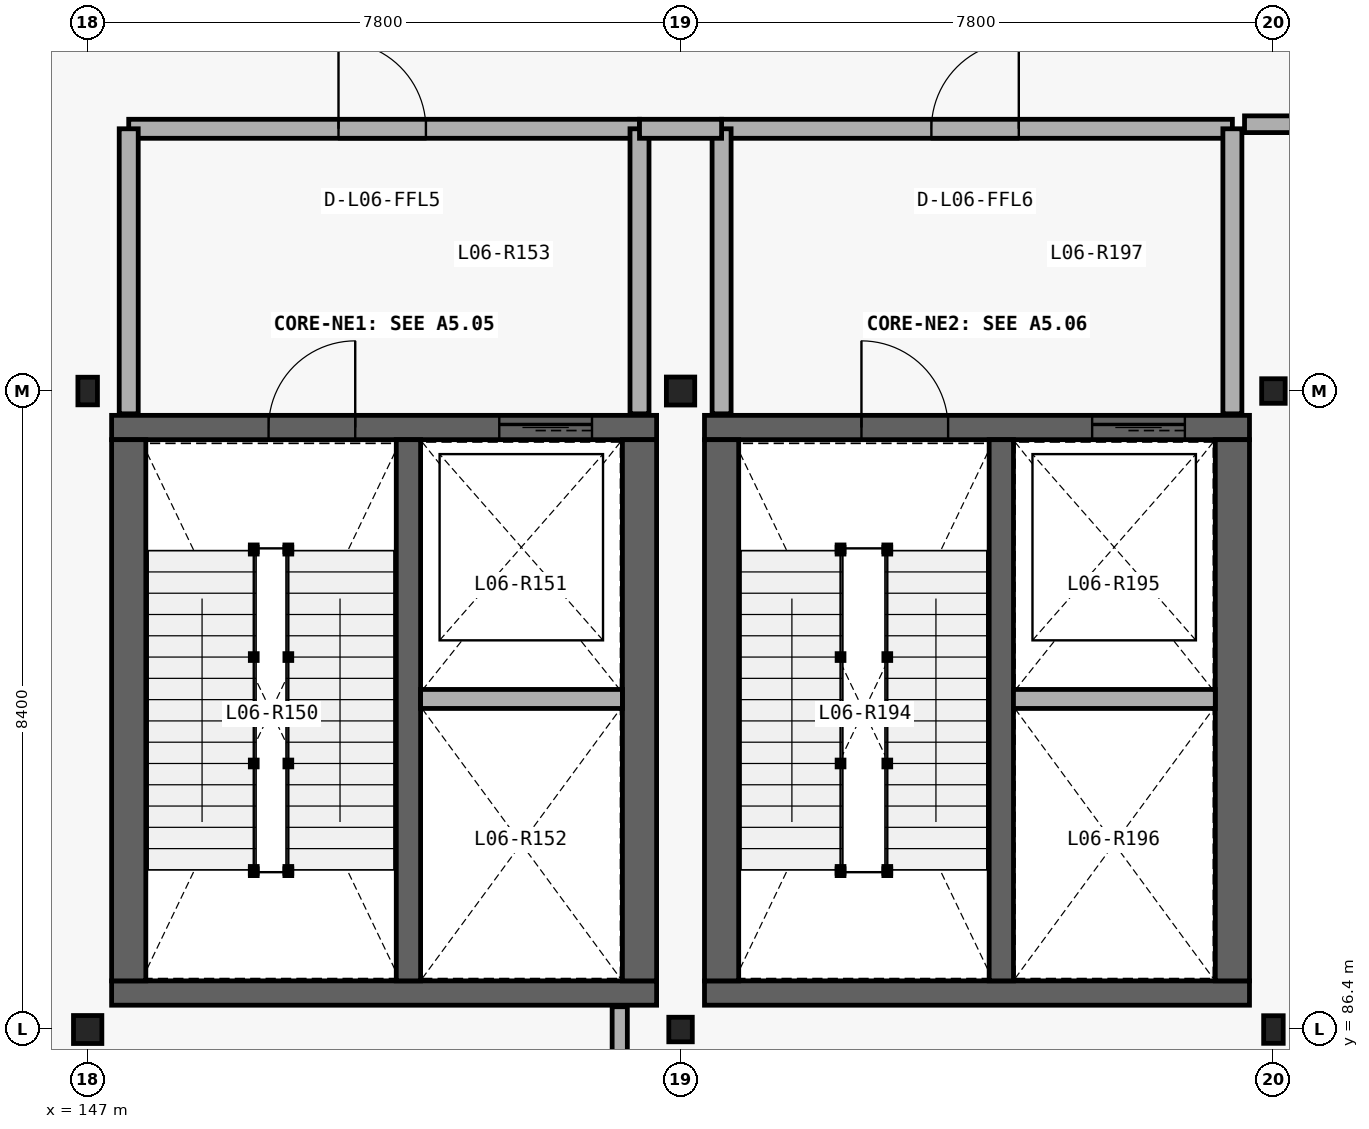
"""IFC4 building model, lengths in metres.
Left out: names, types, materials, properties, quantities, classifications, styles, units other than length and angle.
Written with IfcOpenShell. Run it as: python <this file> out.ifc"""

import sys

from ifc_helpers import new_model, si_unit, direction, frame, frame_2d, origin_with_axes, origin_2d_with_axis, place, context, subcontext, project, spatial, rectangle, i_section, extrude, element, fill, save


model = new_model("IFC4")
c1 = context("Model", 3, precision=1e-05, world=origin_with_axes(), true_north=direction((0.0, 1.0)))
c2 = subcontext(c1, "Body", "Model", "MODEL_VIEW")
j1 = project(units=[si_unit("LENGTHUNIT", "METRE"), si_unit("PLANEANGLEUNIT", "RADIAN")], contexts=[c1])
p1 = place(None, origin_with_axes())
s1 = spatial("IfcSite", under=j1, at=p1, CompositionType="ELEMENT")
p2 = place(p1, origin_with_axes())
s2 = spatial("IfcBuilding", under=s1, at=p2, CompositionType="ELEMENT")
p3 = place(p2, frame((0.0, 0.0, 29.7), z_axis=(0.0, 0.0, 1.0), x_axis=(1.0, 0.0, 0.0)))
s3 = spatial("IfcBuildingStorey", under=s2, at=p3, CompositionType="ELEMENT", Elevation=29.7)
p4 = place(None, frame((147.315, 86.88, 29.7), z_axis=(0.0, 0.0, 1.0), x_axis=(1.0, 0.0, 0.0)))
e1 = element("IfcWall", 1, at=p4, inside=s3, PredefinedType="SHEAR", context=c2, shape_type="SweptSolid", body=[
    extrude(rectangle(XDim=7.17, YDim=0.32, at=frame_2d((3.585, 0.0), x_axis=(1.0, 0.0))), origin_with_axes(), (0.0, 0.0, 1.0), 4.8),
])
p5 = place(None, frame((154.485, 94.32, 29.7), z_axis=(0.0, 0.0, 1.0), x_axis=(-1.0, 0.0, 0.0)))
e2 = element("IfcWall", 2, at=p5, inside=s3, PredefinedType="SHEAR", context=c2, shape_type="SweptSolid", body=[
    extrude(rectangle(XDim=7.17, YDim=0.32, at=frame_2d((3.585, 0.0), x_axis=(1.0, 0.0))), origin_with_axes(), (0.0, 0.0, 1.0), 4.8),
])
p6 = place(None, frame((149.95, 94.32, 29.7), z_axis=(0.0, 0.0, 1.0), x_axis=(-1.0, 0.0, 0.0)))
e3 = element("IfcOpeningElement", 3, at=p6, cuts=e2, PredefinedType="OPENING", context=c2, shape_type="SweptSolid", body=[
    extrude(rectangle(XDim=1.14, YDim=2.18, at=frame_2d((0.0, 1.09), x_axis=(1.0, 0.0))), frame((0.0, 0.17, 0.0), z_axis=(0.0, -1.0, 0.0), x_axis=(1.0, 0.0, 0.0)), (0.0, 0.0, 1.0), 0.34),
])
p7 = place(None, frame((153.025, 94.32, 29.7), z_axis=(0.0, 0.0, 1.0), x_axis=(-1.0, 0.0, 0.0)))
e4 = element("IfcOpeningElement", 4, at=p7, cuts=e2, PredefinedType="OPENING", context=c2, shape_type="SweptSolid", body=[
    extrude(rectangle(XDim=1.22, YDim=2.28, at=frame_2d((0.0, 1.14), x_axis=(1.0, 0.0))), frame((0.0, 0.17, 0.0), z_axis=(0.0, -1.0, 0.0), x_axis=(1.0, 0.0, 0.0)), (0.0, 0.0, 1.0), 0.34),
])
for number, where, z_axis, x_axis in (
    (5, (154.26, 87.04, 29.7), (0.0, 0.0, 1.0), (0.0, 1.0, 0.0)),
    (6, (147.54, 94.16, 29.7), (0.0, 0.0, 1.0), (0.0, -1.0, 0.0)),
):
    element("IfcWall", number, at=place(None, frame(where, z_axis=z_axis, x_axis=x_axis)), inside=s3, PredefinedType="SHEAR", context=c2, shape_type="SweptSolid", body=[
        extrude(rectangle(XDim=7.12, YDim=0.45, at=frame_2d((3.56, 0.0), x_axis=(1.0, 0.0))), origin_with_axes(), (0.0, 0.0, 1.0), 4.8),
    ])
p8 = place(None, frame((151.22, 87.04, 29.7), z_axis=(0.0, 0.0, 1.0), x_axis=(0.0, 1.0, 0.0)))
e7 = element("IfcWall", 7, at=p8, inside=s3, PredefinedType="SHEAR", context=c2, shape_type="SweptSolid", body=[
    extrude(rectangle(XDim=7.12, YDim=0.32, at=frame_2d((3.56, 0.0), x_axis=(1.0, 0.0))), origin_with_axes(), (0.0, 0.0, 1.0), 4.8),
])
p9 = place(None, frame((151.38, 90.749, 29.7), z_axis=(0.0, 0.0, 1.0), x_axis=(1.0, 0.0, 0.0)))
e8 = element("IfcWall", 8, at=p9, inside=s3, PredefinedType="PARTITIONING", context=c2, shape_type="SweptSolid", body=[
    extrude(rectangle(XDim=2.655, YDim=0.25, at=frame_2d((1.327, 0.0), x_axis=(1.0, 0.0))), origin_with_axes(), (0.0, 0.0, 1.0), 4.48),
])
p10 = place(None, frame((154.26, 98.25, 29.7), z_axis=(0.0, 0.0, 1.0), x_axis=(-1.0, 0.0, 0.0)))
e9 = element("IfcWall", 9, at=p10, inside=s3, PredefinedType="PARTITIONING", context=c2, shape_type="SweptSolid", body=[
    extrude(rectangle(XDim=6.72, YDim=0.25, at=frame_2d((3.36, 0.0), x_axis=(1.0, 0.0))), origin_with_axes(), (0.0, 0.0, 1.0), 4.48),
])
p11 = place(None, frame((150.875, 98.25, 29.7), z_axis=(0.0, 0.0, 1.0), x_axis=(-1.0, 0.0, 0.0)))
e10 = element("IfcOpeningElement", 10, at=p11, cuts=e9, PredefinedType="OPENING", context=c2, shape_type="SweptSolid", body=[
    extrude(rectangle(XDim=1.15, YDim=2.25, at=frame_2d((0.0, 1.125), x_axis=(1.0, 0.0))), frame((0.0, 0.135, 0.0), z_axis=(0.0, -1.0, 0.0), x_axis=(1.0, 0.0, 0.0)), (0.0, 0.0, 1.0), 0.27),
])
for number, where, z_axis, x_axis in (
    (11, (147.54, 94.5, 29.7), (0.0, 0.0, 1.0), (0.0, 1.0, 0.0)),
    (12, (154.26, 94.5, 29.7), (0.0, 0.0, 1.0), (0.0, 1.0, 0.0)),
):
    element("IfcWall", number, at=place(None, frame(where, z_axis=z_axis, x_axis=x_axis)), inside=s3, PredefinedType="PARTITIONING", context=c2, shape_type="SweptSolid", body=[
        extrude(rectangle(XDim=3.75, YDim=0.25, at=frame_2d((1.875, 0.0), x_axis=(1.0, 0.0))), origin_with_axes(), (0.0, 0.0, 1.0), 4.48),
    ])
p12 = place(None, frame((155.115, 86.88, 29.7), z_axis=(0.0, 0.0, 1.0), x_axis=(1.0, 0.0, 0.0)))
e13 = element("IfcWall", 13, at=p12, inside=s3, PredefinedType="SHEAR", context=c2, shape_type="SweptSolid", body=[
    extrude(rectangle(XDim=7.17, YDim=0.32, at=frame_2d((3.585, 0.0), x_axis=(1.0, 0.0))), origin_with_axes(), (0.0, 0.0, 1.0), 4.8),
])
p13 = place(None, frame((162.285, 94.32, 29.7), z_axis=(0.0, 0.0, 1.0), x_axis=(-1.0, 0.0, 0.0)))
e14 = element("IfcWall", 14, at=p13, inside=s3, PredefinedType="SHEAR", context=c2, shape_type="SweptSolid", body=[
    extrude(rectangle(XDim=7.17, YDim=0.32, at=frame_2d((3.585, 0.0), x_axis=(1.0, 0.0))), origin_with_axes(), (0.0, 0.0, 1.0), 4.8),
])
p14 = place(None, frame((157.75, 94.32, 29.7), z_axis=(0.0, 0.0, 1.0), x_axis=(-1.0, 0.0, 0.0)))
e15 = element("IfcOpeningElement", 15, at=p14, cuts=e14, PredefinedType="OPENING", context=c2, shape_type="SweptSolid", body=[
    extrude(rectangle(XDim=1.14, YDim=2.18, at=frame_2d((0.0, 1.09), x_axis=(1.0, 0.0))), frame((0.0, 0.17, 0.0), z_axis=(0.0, -1.0, 0.0), x_axis=(1.0, 0.0, 0.0)), (0.0, 0.0, 1.0), 0.34),
])
p15 = place(None, frame((160.825, 94.32, 29.7), z_axis=(0.0, 0.0, 1.0), x_axis=(-1.0, 0.0, 0.0)))
e16 = element("IfcOpeningElement", 16, at=p15, cuts=e14, PredefinedType="OPENING", context=c2, shape_type="SweptSolid", body=[
    extrude(rectangle(XDim=1.22, YDim=2.28, at=frame_2d((0.0, 1.14), x_axis=(1.0, 0.0))), frame((0.0, 0.17, 0.0), z_axis=(0.0, -1.0, 0.0), x_axis=(1.0, 0.0, 0.0)), (0.0, 0.0, 1.0), 0.34),
])
for number, where, z_axis, x_axis in (
    (17, (162.06, 87.04, 29.7), (0.0, 0.0, 1.0), (0.0, 1.0, 0.0)),
    (18, (155.34, 94.16, 29.7), (0.0, 0.0, 1.0), (0.0, -1.0, 0.0)),
):
    element("IfcWall", number, at=place(None, frame(where, z_axis=z_axis, x_axis=x_axis)), inside=s3, PredefinedType="SHEAR", context=c2, shape_type="SweptSolid", body=[
        extrude(rectangle(XDim=7.12, YDim=0.45, at=frame_2d((3.56, 0.0), x_axis=(1.0, 0.0))), origin_with_axes(), (0.0, 0.0, 1.0), 4.8),
    ])
p16 = place(None, frame((159.02, 87.04, 29.7), z_axis=(0.0, 0.0, 1.0), x_axis=(0.0, 1.0, 0.0)))
e19 = element("IfcWall", 19, at=p16, inside=s3, PredefinedType="SHEAR", context=c2, shape_type="SweptSolid", body=[
    extrude(rectangle(XDim=7.12, YDim=0.32, at=frame_2d((3.56, 0.0), x_axis=(1.0, 0.0))), origin_with_axes(), (0.0, 0.0, 1.0), 4.8),
])
p17 = place(None, frame((159.18, 90.749, 29.7), z_axis=(0.0, 0.0, 1.0), x_axis=(1.0, 0.0, 0.0)))
e20 = element("IfcWall", 20, at=p17, inside=s3, PredefinedType="PARTITIONING", context=c2, shape_type="SweptSolid", body=[
    extrude(rectangle(XDim=2.655, YDim=0.25, at=frame_2d((1.327, 0.0), x_axis=(1.0, 0.0))), origin_with_axes(), (0.0, 0.0, 1.0), 4.48),
])
p18 = place(None, frame((162.06, 98.25, 29.7), z_axis=(0.0, 0.0, 1.0), x_axis=(-1.0, 0.0, 0.0)))
e21 = element("IfcWall", 21, at=p18, inside=s3, PredefinedType="PARTITIONING", context=c2, shape_type="SweptSolid", body=[
    extrude(rectangle(XDim=6.72, YDim=0.25, at=frame_2d((3.36, 0.0), x_axis=(1.0, 0.0))), origin_with_axes(), (0.0, 0.0, 1.0), 4.48),
])
p19 = place(None, frame((158.675, 98.25, 29.7), z_axis=(0.0, 0.0, 1.0), x_axis=(-1.0, 0.0, 0.0)))
e22 = element("IfcOpeningElement", 22, at=p19, cuts=e21, PredefinedType="OPENING", context=c2, shape_type="SweptSolid", body=[
    extrude(rectangle(XDim=1.15, YDim=2.25, at=frame_2d((0.0, 1.125), x_axis=(1.0, 0.0))), frame((0.0, 0.135, 0.0), z_axis=(0.0, -1.0, 0.0), x_axis=(1.0, 0.0, 0.0)), (0.0, 0.0, 1.0), 0.27),
])
for number, where, z_axis, x_axis in (
    (23, (155.34, 94.5, 29.7), (0.0, 0.0, 1.0), (0.0, 1.0, 0.0)),
    (24, (162.06, 94.5, 29.7), (0.0, 0.0, 1.0), (0.0, 1.0, 0.0)),
):
    element("IfcWall", number, at=place(None, frame(where, z_axis=z_axis, x_axis=x_axis)), inside=s3, PredefinedType="PARTITIONING", context=c2, shape_type="SweptSolid", body=[
        extrude(rectangle(XDim=3.75, YDim=0.25, at=frame_2d((1.875, 0.0), x_axis=(1.0, 0.0))), origin_with_axes(), (0.0, 0.0, 1.0), 4.48),
    ])
p20 = place(None, frame((154.26, 98.25, 29.7), z_axis=(0.0, 0.0, 1.0), x_axis=(1.0, 0.0, 0.0)))
e25 = element("IfcWall", 25, at=p20, inside=s3, PredefinedType="PARTITIONING", context=c2, shape_type="SweptSolid", body=[
    extrude(rectangle(XDim=1.08, YDim=0.25, at=frame_2d((0.54, 0.0), x_axis=(1.0, 0.0))), origin_with_axes(), (0.0, 0.0, 1.0), 4.48),
])
p21 = place(None, frame((162.22, 98.31, 29.7), z_axis=(0.0, 0.0, 1.0), x_axis=(1.0, 0.0, 0.0)))
e26 = element("IfcWall", 26, at=p21, inside=s3, PredefinedType="PARTITIONING", context=c2, shape_type="SweptSolid", body=[
    extrude(rectangle(XDim=7.04, YDim=0.22, at=frame_2d((3.52, 0.0), x_axis=(1.0, 0.0))), origin_with_axes(), (0.0, 0.0, 1.0), 4.48),
])
p22 = place(None, frame((164.242, 98.31, 29.7), z_axis=(0.0, 0.0, 1.0), x_axis=(1.0, 0.0, 0.0)))
e27 = element("IfcOpeningElement", 27, at=p22, cuts=e26, PredefinedType="OPENING", context=c2, shape_type="SweptSolid", body=[
    extrude(rectangle(XDim=1.64, YDim=2.42, at=frame_2d((0.0, 1.21), x_axis=(1.0, 0.0))), frame((0.0, 0.12, 0.0), z_axis=(0.0, -1.0, 0.0), x_axis=(1.0, 0.0, 0.0)), (0.0, 0.0, 1.0), 0.24),
])
p23 = place(None, frame((167.438, 98.31, 29.7), z_axis=(0.0, 0.0, 1.0), x_axis=(1.0, 0.0, 0.0)))
e28 = element("IfcOpeningElement", 28, at=p23, cuts=e26, PredefinedType="OPENING", context=c2, shape_type="SweptSolid", body=[
    extrude(rectangle(XDim=0.95, YDim=2.1, at=frame_2d((0.0, 1.05), x_axis=(1.0, 0.0))), frame((0.0, 0.12, 0.0), z_axis=(0.0, -1.0, 0.0), x_axis=(1.0, 0.0, 0.0)), (0.0, 0.0, 1.0), 0.24),
])
p24 = place(None, frame((154.0, 78.14, 29.7), z_axis=(0.0, 0.0, 1.0), x_axis=(0.0, 1.0, 0.0)))
e29 = element("IfcWall", 29, at=p24, inside=s3, PredefinedType="PARTITIONING", context=c2, shape_type="SweptSolid", body=[
    extrude(rectangle(XDim=8.56, YDim=0.2, at=frame_2d((4.28, 0.0), x_axis=(1.0, 0.0))), origin_with_axes(), (0.0, 0.0, 1.0), 4.48),
])
p25 = place(None, frame((147.0, 86.4, 29.7), z_axis=(0.0, 0.0, 1.0), x_axis=(1.0, 0.0, 0.0)))
e30 = element("IfcColumn", 30, at=p25, inside=s3, PredefinedType="COLUMN", context=c2, shape_type="SweptSolid", body=[
    extrude(i_section(OverallWidth=0.373, OverallDepth=0.368, WebThickness=0.015, FlangeThickness=0.024, at=origin_2d_with_axis()), origin_with_axes(), (0.0, 0.0, 1.0), 4.8),
])
p26 = place(None, frame((147.0, 94.8, 29.7), z_axis=(0.0, 0.0, 1.0), x_axis=(1.0, 0.0, 0.0)))
e31 = element("IfcColumn", 31, at=p26, inside=s3, PredefinedType="COLUMN", context=c2, shape_type="SweptSolid", body=[
    extrude(i_section(OverallWidth=0.257, OverallDepth=0.363, WebThickness=0.013, FlangeThickness=0.022, at=origin_2d_with_axis()), origin_with_axes(), (0.0, 0.0, 1.0), 4.8),
])
p27 = place(None, frame((154.8, 86.4, 29.7), z_axis=(0.0, 0.0, 1.0), x_axis=(1.0, 0.0, 0.0)))
e32 = element("IfcColumn", 32, at=p27, inside=s3, PredefinedType="COLUMN", context=c2, shape_type="SweptSolid", body=[
    extrude(i_section(OverallWidth=0.309, OverallDepth=0.323, WebThickness=0.014, FlangeThickness=0.023, at=origin_2d_with_axis()), origin_with_axes(), (0.0, 0.0, 1.0), 4.8),
])
p28 = place(None, frame((154.8, 94.8, 29.7), z_axis=(0.0, 0.0, 1.0), x_axis=(1.0, 0.0, 0.0)))
e33 = element("IfcColumn", 33, at=p28, inside=s3, PredefinedType="COLUMN", context=c2, shape_type="SweptSolid", body=[
    extrude(i_section(OverallWidth=0.373, OverallDepth=0.368, WebThickness=0.015, FlangeThickness=0.024, at=origin_2d_with_axis()), origin_with_axes(), (0.0, 0.0, 1.0), 4.8),
])
p29 = place(None, frame((162.6, 86.4, 29.7), z_axis=(0.0, 0.0, 1.0), x_axis=(1.0, 0.0, 0.0)))
e34 = element("IfcColumn", 34, at=p29, inside=s3, PredefinedType="COLUMN", context=c2, shape_type="SweptSolid", body=[
    extrude(i_section(OverallWidth=0.257, OverallDepth=0.363, WebThickness=0.013, FlangeThickness=0.022, at=origin_2d_with_axis()), origin_with_axes(), (0.0, 0.0, 1.0), 4.8),
])
p30 = place(None, frame((162.6, 94.8, 29.7), z_axis=(0.0, 0.0, 1.0), x_axis=(1.0, 0.0, 0.0)))
e35 = element("IfcColumn", 35, at=p30, inside=s3, PredefinedType="COLUMN", context=c2, shape_type="SweptSolid", body=[
    extrude(i_section(OverallWidth=0.309, OverallDepth=0.323, WebThickness=0.014, FlangeThickness=0.023, at=origin_2d_with_axis()), origin_with_axes(), (0.0, 0.0, 1.0), 4.8),
])
p31 = place(None, frame((149.95, 94.32, 29.7), z_axis=(0.0, 0.0, 1.0), x_axis=(1.0, 0.0, 0.0)))
e36 = element("IfcDoor", 36, at=p31, inside=s3, OperationType="SINGLE_SWING_LEFT", PredefinedType="DOOR", context=c2, shape_type="SweptSolid", body=[
    extrude(rectangle(XDim=1.14, YDim=2.18, at=frame_2d((0.0, 1.09), x_axis=(1.0, 0.0))), frame((0.0, 0.04, 0.0), z_axis=(0.0, -1.0, 0.0), x_axis=(1.0, 0.0, 0.0)), (0.0, 0.0, 1.0), 0.08),
])
fill(e3, e36)
p32 = place(None, frame((153.025, 94.32, 29.7), z_axis=(0.0, 0.0, 1.0), x_axis=(1.0, 0.0, 0.0)))
e37 = element("IfcDoor", 37, at=p32, inside=s3, OperationType="SLIDING_TO_LEFT", PredefinedType="DOOR", context=c2, shape_type="SweptSolid", body=[
    extrude(rectangle(XDim=1.22, YDim=2.28, at=frame_2d((0.0, 1.14), x_axis=(1.0, 0.0))), frame((0.0, 0.04, 0.0), z_axis=(0.0, -1.0, 0.0), x_axis=(1.0, 0.0, 0.0)), (0.0, 0.0, 1.0), 0.08),
])
fill(e4, e37)
p33 = place(None, frame((150.875, 98.25, 29.7), z_axis=(0.0, 0.0, 1.0), x_axis=(1.0, 0.0, 0.0)))
e38 = element("IfcDoor", 38, at=p33, inside=s3, OperationType="SINGLE_SWING_RIGHT", PredefinedType="DOOR", context=c2, shape_type="SweptSolid", body=[
    extrude(rectangle(XDim=1.15, YDim=2.25, at=frame_2d((0.0, 1.125), x_axis=(1.0, 0.0))), frame((0.0, 0.04, 0.0), z_axis=(0.0, -1.0, 0.0), x_axis=(1.0, 0.0, 0.0)), (0.0, 0.0, 1.0), 0.08),
])
fill(e10, e38)
p34 = place(None, frame((157.75, 94.32, 29.7), z_axis=(0.0, 0.0, 1.0), x_axis=(1.0, 0.0, 0.0)))
e39 = element("IfcDoor", 39, at=p34, inside=s3, OperationType="SINGLE_SWING_RIGHT", PredefinedType="DOOR", context=c2, shape_type="SweptSolid", body=[
    extrude(rectangle(XDim=1.14, YDim=2.18, at=frame_2d((0.0, 1.09), x_axis=(1.0, 0.0))), frame((0.0, 0.04, 0.0), z_axis=(0.0, -1.0, 0.0), x_axis=(1.0, 0.0, 0.0)), (0.0, 0.0, 1.0), 0.08),
])
fill(e15, e39)
p35 = place(None, frame((160.825, 94.32, 29.7), z_axis=(0.0, 0.0, 1.0), x_axis=(1.0, 0.0, 0.0)))
e40 = element("IfcDoor", 40, at=p35, inside=s3, OperationType="SLIDING_TO_LEFT", PredefinedType="DOOR", context=c2, shape_type="SweptSolid", body=[
    extrude(rectangle(XDim=1.22, YDim=2.28, at=frame_2d((0.0, 1.14), x_axis=(1.0, 0.0))), frame((0.0, 0.04, 0.0), z_axis=(0.0, -1.0, 0.0), x_axis=(1.0, 0.0, 0.0)), (0.0, 0.0, 1.0), 0.08),
])
fill(e16, e40)
p36 = place(None, frame((158.675, 98.25, 29.7), z_axis=(0.0, 0.0, 1.0), x_axis=(1.0, 0.0, 0.0)))
e41 = element("IfcDoor", 41, at=p36, inside=s3, OperationType="SINGLE_SWING_LEFT", PredefinedType="DOOR", context=c2, shape_type="SweptSolid", body=[
    extrude(rectangle(XDim=1.15, YDim=2.25, at=frame_2d((0.0, 1.125), x_axis=(1.0, 0.0))), frame((0.0, 0.04, 0.0), z_axis=(0.0, -1.0, 0.0), x_axis=(1.0, 0.0, 0.0)), (0.0, 0.0, 1.0), 0.08),
])
fill(e22, e41)
save(model, sys.argv[1])
